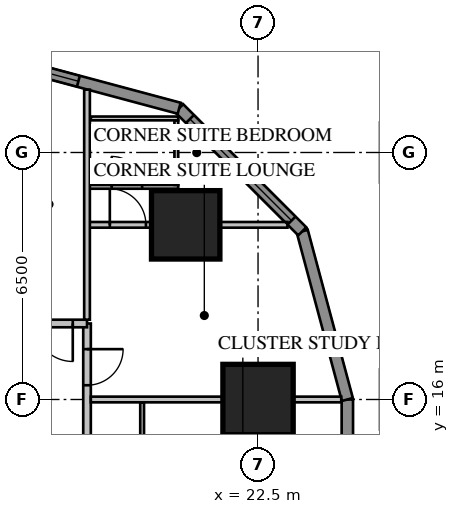
"""IFC4 building model, lengths in metres.
Left out: names, types, materials, properties, quantities, classifications, styles, units other than length and angle.
Written with IfcOpenShell. Run it as: python <this file> out.ifc"""

import sys

from ifc_helpers import new_model, si_unit, direction, frame, frame_2d, origin, origin_2d, place, context, subcontext, project, spatial, rectangle, extrude, element, fill, save


model = new_model("IFC4")
c1 = context("Model", 3, precision=1e-05, world=origin(), true_north=direction((0.0, 1.0)))
c2 = subcontext(c1, "Body", "Model", "MODEL_VIEW")
j1 = project(units=[si_unit("LENGTHUNIT", "METRE"), si_unit("PLANEANGLEUNIT", "RADIAN")], contexts=[c1])
p1 = place(None, origin())
s1 = spatial("IfcSite", under=j1, at=p1, CompositionType="ELEMENT")
p2 = place(p1, origin())
s2 = spatial("IfcBuilding", under=s1, at=p2, CompositionType="ELEMENT")
p3 = place(p2, frame((0.0, 0.0, 23.7)))
s3 = spatial("IfcBuildingStorey", under=s2, at=p3, CompositionType="ELEMENT", Elevation=23.7)
p4 = place(p3, frame((22.5, 16.0, 0.0), z_axis=(0.0, 0.0, 1.0), x_axis=(1.0, 0.0, 0.0)))
e1 = element("IfcColumn", 1, at=p4, inside=s3, PredefinedType="COLUMN", context=c2, shape_type="SweptSolid", body=[
    extrude(rectangle(XDim=1.85, YDim=1.85, at=origin_2d()), origin(), (0.0, 0.0, 1.0), 3.85),
])
p5 = place(p3, frame((20.596, 20.596, 0.0), z_axis=(0.0, 0.0, 1.0), x_axis=(1.0, 0.0, 0.0)))
e2 = element("IfcColumn", 2, at=p5, inside=s3, PredefinedType="COLUMN", context=c2, shape_type="SweptSolid", body=[
    extrude(rectangle(XDim=1.8, YDim=1.8, at=origin_2d()), origin(), (0.0, 0.0, 1.0), 3.85),
])
p6 = place(p3, frame((24.85, -16.0, 0.0), z_axis=(0.0, 0.0, 1.0), x_axis=(0.0, 1.0, 0.0)))
e3 = element("IfcWall", 3, at=p6, inside=s3, PredefinedType="SOLIDWALL", context=c2, shape_type="SweptSolid", body=[
    extrude(rectangle(XDim=32.0, YDim=0.3, at=frame_2d((16.0, 0.0))), origin(), (0.0, 0.0, 1.0), 3.65),
])
p7 = place(p6, frame((1.2, 0.0, 0.75)))
e4 = element("IfcOpeningElement", 4, at=p7, cuts=e3, PredefinedType="OPENING", context=c2, shape_type="SweptSolid", body=[
    extrude(rectangle(XDim=1.6, YDim=1.8, at=frame_2d((0.8, 0.9))), frame((0.0, 0.17, 0.0), z_axis=(0.0, -1.0, 0.0), x_axis=(1.0, 0.0, 0.0)), (0.0, 0.0, 1.0), 0.34),
])
p8 = place(p6, frame((5.2, 0.0, 0.75)))
e5 = element("IfcOpeningElement", 5, at=p8, cuts=e3, PredefinedType="OPENING", context=c2, shape_type="SweptSolid", body=[
    extrude(rectangle(XDim=1.6, YDim=1.8, at=frame_2d((0.8, 0.9))), frame((0.0, 0.17, 0.0), z_axis=(0.0, -1.0, 0.0), x_axis=(1.0, 0.0, 0.0)), (0.0, 0.0, 1.0), 0.34),
])
p9 = place(p6, frame((17.2, 0.0, 0.75)))
e6 = element("IfcOpeningElement", 6, at=p9, cuts=e3, PredefinedType="OPENING", context=c2, shape_type="SweptSolid", body=[
    extrude(rectangle(XDim=1.6, YDim=1.8, at=frame_2d((0.8, 0.9))), frame((0.0, 0.17, 0.0), z_axis=(0.0, -1.0, 0.0), x_axis=(1.0, 0.0, 0.0)), (0.0, 0.0, 1.0), 0.34),
])
p10 = place(p6, frame((21.2, 0.0, 0.75)))
e7 = element("IfcOpeningElement", 7, at=p10, cuts=e3, PredefinedType="OPENING", context=c2, shape_type="SweptSolid", body=[
    extrude(rectangle(XDim=1.6, YDim=1.8, at=frame_2d((0.8, 0.9))), frame((0.0, 0.17, 0.0), z_axis=(0.0, -1.0, 0.0), x_axis=(1.0, 0.0, 0.0)), (0.0, 0.0, 1.0), 0.34),
])
p11 = place(p6, frame((25.2, 0.0, 0.75)))
e8 = element("IfcOpeningElement", 8, at=p11, cuts=e3, PredefinedType="OPENING", context=c2, shape_type="SweptSolid", body=[
    extrude(rectangle(XDim=1.6, YDim=1.8, at=frame_2d((0.8, 0.9))), frame((0.0, 0.17, 0.0), z_axis=(0.0, -1.0, 0.0), x_axis=(1.0, 0.0, 0.0)), (0.0, 0.0, 1.0), 0.34),
])
p12 = place(p6, frame((29.2, 0.0, 0.75)))
e9 = element("IfcOpeningElement", 9, at=p12, cuts=e3, PredefinedType="OPENING", context=c2, shape_type="SweptSolid", body=[
    extrude(rectangle(XDim=1.6, YDim=1.8, at=frame_2d((0.8, 0.9))), frame((0.0, 0.17, 0.0), z_axis=(0.0, -1.0, 0.0), x_axis=(1.0, 0.0, 0.0)), (0.0, 0.0, 1.0), 0.34),
])
p13 = place(p6, frame((8.8, 0.0, 0.75)))
e10 = element("IfcOpeningElement", 10, at=p13, cuts=e3, PredefinedType="OPENING", context=c2, shape_type="SweptSolid", body=[
    extrude(rectangle(XDim=2.4, YDim=1.8, at=frame_2d((1.2, 0.9))), frame((0.0, 0.17, 0.0), z_axis=(0.0, -1.0, 0.0), x_axis=(1.0, 0.0, 0.0)), (0.0, 0.0, 1.0), 0.34),
])
p14 = place(p6, frame((13.812, 0.0, 0.0)))
e11 = element("IfcOpeningElement", 11, at=p14, cuts=e3, PredefinedType="OPENING", context=c2, shape_type="SweptSolid", body=[
    extrude(rectangle(XDim=1.0, YDim=2.4, at=frame_2d((0.5, 1.2))), frame((0.0, 0.17, 0.0), z_axis=(0.0, -1.0, 0.0), x_axis=(1.0, 0.0, 0.0)), (0.0, 0.0, 1.0), 0.34),
])
p15 = place(p3, frame((24.85, 16.0, 0.0), z_axis=(0.0, 0.0, 1.0), x_axis=(-0.258839972501, 0.965920218567, 0.0)))
e12 = element("IfcWall", 12, at=p15, inside=s3, PredefinedType="SOLIDWALL", context=c2, shape_type="SweptSolid", body=[
    extrude(rectangle(XDim=4.581, YDim=0.3, at=frame_2d((2.291, 0.0))), origin(), (0.0, 0.0, 1.0), 3.65),
])
p16 = place(p3, frame((23.664, 20.425, 0.0), z_axis=(0.0, 0.0, 1.0), x_axis=(-0.707106781187, 0.707106781187, 0.0)))
e13 = element("IfcWall", 13, at=p16, inside=s3, PredefinedType="SOLIDWALL", context=c2, shape_type="SweptSolid", body=[
    extrude(rectangle(XDim=4.581, YDim=0.3, at=frame_2d((2.291, 0.0))), origin(), (0.0, 0.0, 1.0), 3.65),
])
p17 = place(p16, frame((0.4, 0.0, 0.75)))
e14 = element("IfcOpeningElement", 14, at=p17, cuts=e13, PredefinedType="OPENING", context=c2, shape_type="SweptSolid", body=[
    extrude(rectangle(XDim=3.781, YDim=1.8, at=frame_2d((1.891, 0.9))), frame((0.0, 0.17, 0.0), z_axis=(0.0, -1.0, 0.0), x_axis=(1.0, 0.0, 0.0)), (0.0, 0.0, 1.0), 0.34),
])
p18 = place(p3, frame((20.425, 23.664, 0.0), z_axis=(0.0, 0.0, 1.0), x_axis=(-0.965920218567, 0.258839972501, 0.0)))
e15 = element("IfcWall", 15, at=p18, inside=s3, PredefinedType="SOLIDWALL", context=c2, shape_type="SweptSolid", body=[
    extrude(rectangle(XDim=4.581, YDim=0.3, at=frame_2d((2.291, 0.0))), origin(), (0.0, 0.0, 1.0), 3.65),
])
p19 = place(p18, frame((2.746, 0.0, 0.75)))
e16 = element("IfcOpeningElement", 16, at=p19, cuts=e15, PredefinedType="OPENING", context=c2, shape_type="SweptSolid", body=[
    extrude(rectangle(XDim=1.6, YDim=1.8, at=frame_2d((0.8, 0.9))), frame((0.0, 0.17, 0.0), z_axis=(0.0, -1.0, 0.0), x_axis=(1.0, 0.0, 0.0)), (0.0, 0.0, 1.0), 0.34),
])
p20 = place(p3, frame((18.0, -18.0, 0.0), z_axis=(0.0, 0.0, 1.0), x_axis=(0.0, 1.0, 0.0)))
e17 = element("IfcWall", 17, at=p20, inside=s3, PredefinedType="PARTITIONING", context=c2, shape_type="SweptSolid", body=[
    extrude(rectangle(XDim=36.0, YDim=0.2, at=frame_2d((18.0, 0.0))), origin(), (0.0, 0.0, 1.0), 3.65),
])
p21 = place(p20, frame((10.4, 0.0, 0.0)))
e18 = element("IfcOpeningElement", 18, at=p21, cuts=e17, PredefinedType="OPENING", context=c2, shape_type="SweptSolid", body=[
    extrude(rectangle(XDim=1.0, YDim=2.1, at=frame_2d((0.5, 1.05))), frame((0.0, 0.12, 0.0), z_axis=(0.0, -1.0, 0.0), x_axis=(1.0, 0.0, 0.0)), (0.0, 0.0, 1.0), 0.24),
])
p22 = place(p20, frame((0.375, 0.0, 0.0)))
e19 = element("IfcOpeningElement", 19, at=p22, cuts=e17, PredefinedType="OPENING", context=c2, shape_type="SweptSolid", body=[
    extrude(rectangle(XDim=1.0, YDim=2.1, at=frame_2d((0.5, 1.05))), frame((0.0, 0.12, 0.0), z_axis=(0.0, -1.0, 0.0), x_axis=(1.0, 0.0, 0.0)), (0.0, 0.0, 1.0), 0.24),
])
p23 = place(p20, frame((34.375, 0.0, 0.0)))
e20 = element("IfcOpeningElement", 20, at=p23, cuts=e17, PredefinedType="OPENING", context=c2, shape_type="SweptSolid", body=[
    extrude(rectangle(XDim=0.95, YDim=2.1, at=frame_2d((0.475, 1.05))), frame((0.0, 0.12, 0.0), z_axis=(0.0, -1.0, 0.0), x_axis=(1.0, 0.0, 0.0)), (0.0, 0.0, 1.0), 0.24),
])
p24 = place(p3, frame((19.45, -15.925, 0.0), z_axis=(0.0, 0.0, 1.0), x_axis=(0.0, 1.0, 0.0)))
e21 = element("IfcWall", 21, at=p24, inside=s3, PredefinedType="PARTITIONING", context=c2, shape_type="SweptSolid", body=[
    extrude(rectangle(XDim=31.85, YDim=0.1, at=frame_2d((15.925, 0.0))), origin(), (0.0, 0.0, 1.0), 3.65),
])
p25 = place(p24, frame((10.125, 0.0, 0.0)))
e22 = element("IfcOpeningElement", 22, at=p25, cuts=e21, PredefinedType="OPENING", context=c2, shape_type="SweptSolid", body=[
    extrude(rectangle(XDim=1.0, YDim=2.1, at=frame_2d((0.5, 1.05))), frame((0.0, 0.07, 0.0), z_axis=(0.0, -1.0, 0.0), x_axis=(1.0, 0.0, 0.0)), (0.0, 0.0, 1.0), 0.14),
])
p26 = place(p24, frame((8.3, 0.0, 0.0)))
e23 = element("IfcOpeningElement", 23, at=p26, cuts=e21, PredefinedType="OPENING", context=c2, shape_type="SweptSolid", body=[
    extrude(rectangle(XDim=0.8, YDim=2.1, at=frame_2d((0.4, 1.05))), frame((0.0, 0.07, 0.0), z_axis=(0.0, -1.0, 0.0), x_axis=(1.0, 0.0, 0.0)), (0.0, 0.0, 1.0), 0.14),
])
p27 = place(p24, frame((1.725, 0.0, 0.0)))
e24 = element("IfcOpeningElement", 24, at=p27, cuts=e21, PredefinedType="OPENING", context=c2, shape_type="SweptSolid", body=[
    extrude(rectangle(XDim=0.95, YDim=2.1, at=frame_2d((0.475, 1.05))), frame((0.0, 0.07, 0.0), z_axis=(0.0, -1.0, 0.0), x_axis=(1.0, 0.0, 0.0)), (0.0, 0.0, 1.0), 0.14),
])
p28 = place(p24, frame((5.725, 0.0, 0.0)))
e25 = element("IfcOpeningElement", 25, at=p28, cuts=e21, PredefinedType="OPENING", context=c2, shape_type="SweptSolid", body=[
    extrude(rectangle(XDim=0.95, YDim=2.1, at=frame_2d((0.475, 1.05))), frame((0.0, 0.07, 0.0), z_axis=(0.0, -1.0, 0.0), x_axis=(1.0, 0.0, 0.0)), (0.0, 0.0, 1.0), 0.14),
])
p29 = place(p24, frame((17.725, 0.0, 0.0)))
e26 = element("IfcOpeningElement", 26, at=p29, cuts=e21, PredefinedType="OPENING", context=c2, shape_type="SweptSolid", body=[
    extrude(rectangle(XDim=0.95, YDim=2.1, at=frame_2d((0.475, 1.05))), frame((0.0, 0.07, 0.0), z_axis=(0.0, -1.0, 0.0), x_axis=(1.0, 0.0, 0.0)), (0.0, 0.0, 1.0), 0.14),
])
p30 = place(p24, frame((21.725, 0.0, 0.0)))
e27 = element("IfcOpeningElement", 27, at=p30, cuts=e21, PredefinedType="OPENING", context=c2, shape_type="SweptSolid", body=[
    extrude(rectangle(XDim=0.95, YDim=2.1, at=frame_2d((0.475, 1.05))), frame((0.0, 0.07, 0.0), z_axis=(0.0, -1.0, 0.0), x_axis=(1.0, 0.0, 0.0)), (0.0, 0.0, 1.0), 0.14),
])
p31 = place(p24, frame((25.725, 0.0, 0.0)))
e28 = element("IfcOpeningElement", 28, at=p31, cuts=e21, PredefinedType="OPENING", context=c2, shape_type="SweptSolid", body=[
    extrude(rectangle(XDim=0.95, YDim=2.1, at=frame_2d((0.475, 1.05))), frame((0.0, 0.07, 0.0), z_axis=(0.0, -1.0, 0.0), x_axis=(1.0, 0.0, 0.0)), (0.0, 0.0, 1.0), 0.14),
])
p32 = place(p24, frame((29.725, 0.0, 0.0)))
e29 = element("IfcOpeningElement", 29, at=p32, cuts=e21, PredefinedType="OPENING", context=c2, shape_type="SweptSolid", body=[
    extrude(rectangle(XDim=0.95, YDim=2.1, at=frame_2d((0.475, 1.05))), frame((0.0, 0.07, 0.0), z_axis=(0.0, -1.0, 0.0), x_axis=(1.0, 0.0, 0.0)), (0.0, 0.0, 1.0), 0.14),
])
p33 = place(p3, frame((18.1, 16.0, 0.0), z_axis=(0.0, 0.0, 1.0), x_axis=(1.0, 0.0, 0.0)))
e30 = element("IfcWall", 30, at=p33, inside=s3, PredefinedType="PARTITIONING", context=c2, shape_type="SweptSolid", body=[
    extrude(rectangle(XDim=6.589, YDim=0.15, at=frame_2d((3.295, 0.0))), origin(), (0.0, 0.0, 1.0), 3.65),
])
p34 = place(p3, frame((18.065, 21.596, 0.0), z_axis=(0.0, 0.0, 1.0), x_axis=(1.0, 0.0, 0.0)))
e31 = element("IfcWall", 31, at=p34, inside=s3, PredefinedType="PARTITIONING", context=c2, shape_type="SweptSolid", body=[
    extrude(rectangle(XDim=2.335, YDim=0.1, at=frame_2d((1.167, 0.0))), origin(), (0.0, 0.0, 1.0), 3.65),
])
p35 = place(p34, frame((0.585, 0.0, 0.0)))
e32 = element("IfcOpeningElement", 32, at=p35, cuts=e31, PredefinedType="OPENING", context=c2, shape_type="SweptSolid", body=[
    extrude(rectangle(XDim=0.8, YDim=2.1, at=frame_2d((0.4, 1.05))), frame((0.0, 0.07, 0.0), z_axis=(0.0, -1.0, 0.0), x_axis=(1.0, 0.0, 0.0)), (0.0, 0.0, 1.0), 0.14),
])
p36 = place(p3, frame((20.35, 21.646, 0.0), z_axis=(0.0, 0.0, 1.0), x_axis=(0.0, 1.0, 0.0)))
e33 = element("IfcWall", 33, at=p36, inside=s3, PredefinedType="PARTITIONING", context=c2, shape_type="SweptSolid", body=[
    extrude(rectangle(XDim=1.7, YDim=0.1, at=frame_2d((0.85, 0.0))), origin(), (0.0, 0.0, 1.0), 3.65),
])
p37 = place(p3, frame((18.1, 23.396, 0.0), z_axis=(0.0, 0.0, 1.0), x_axis=(1.0, 0.0, 0.0)))
e34 = element("IfcWall", 34, at=p37, inside=s3, PredefinedType="PARTITIONING", context=c2, shape_type="SweptSolid", body=[
    extrude(rectangle(XDim=2.3, YDim=0.1, at=frame_2d((1.15, 0.0))), origin(), (0.0, 0.0, 1.0), 3.65),
])
p38 = place(p3, frame((18.065, 20.596, 0.0), z_axis=(0.0, 0.0, 1.0), x_axis=(1.0, 0.0, 0.0)))
e35 = element("IfcWall", 35, at=p38, inside=s3, PredefinedType="PARTITIONING", context=c2, shape_type="SweptSolid", body=[
    extrude(rectangle(XDim=5.209, YDim=0.15, at=frame_2d((2.604, 0.0))), origin(), (0.0, 0.0, 1.0), 3.65),
])
p39 = place(p38, frame((0.535, 0.0, 0.0)))
e36 = element("IfcOpeningElement", 36, at=p39, cuts=e35, PredefinedType="OPENING", context=c2, shape_type="SweptSolid", body=[
    extrude(rectangle(XDim=0.95, YDim=2.1, at=frame_2d((0.475, 1.05))), frame((0.0, 0.095, 0.0), z_axis=(0.0, -1.0, 0.0), x_axis=(1.0, 0.0, 0.0)), (0.0, 0.0, 1.0), 0.19),
])
p40 = place(p3, frame((18.0, 18.0, 0.0), z_axis=(0.0, 0.0, 1.0), x_axis=(-1.0, 0.0, 0.0)))
e37 = element("IfcWall", 37, at=p40, inside=s3, PredefinedType="PARTITIONING", context=c2, shape_type="SweptSolid", body=[
    extrude(rectangle(XDim=36.0, YDim=0.2, at=frame_2d((18.0, 0.0))), origin(), (0.0, 0.0, 1.0), 3.65),
])
p41 = place(p40, frame((0.375, 0.0, 0.0)))
e38 = element("IfcOpeningElement", 38, at=p41, cuts=e37, PredefinedType="OPENING", context=c2, shape_type="SweptSolid", body=[
    extrude(rectangle(XDim=1.0, YDim=2.1, at=frame_2d((0.5, 1.05))), frame((0.0, 0.12, 0.0), z_axis=(0.0, -1.0, 0.0), x_axis=(1.0, 0.0, 0.0)), (0.0, 0.0, 1.0), 0.24),
])
p42 = place(p40, frame((3.8, 0.0, 0.0)))
e39 = element("IfcOpeningElement", 39, at=p42, cuts=e37, PredefinedType="OPENING", context=c2, shape_type="SweptSolid", body=[
    extrude(rectangle(XDim=0.95, YDim=2.1, at=frame_2d((0.475, 1.05))), frame((0.0, 0.12, 0.0), z_axis=(0.0, -1.0, 0.0), x_axis=(1.0, 0.0, 0.0)), (0.0, 0.0, 1.0), 0.24),
])
p43 = place(p40, frame((7.8, 0.0, 0.0)))
e40 = element("IfcOpeningElement", 40, at=p43, cuts=e37, PredefinedType="OPENING", context=c2, shape_type="SweptSolid", body=[
    extrude(rectangle(XDim=0.95, YDim=2.1, at=frame_2d((0.475, 1.05))), frame((0.0, 0.12, 0.0), z_axis=(0.0, -1.0, 0.0), x_axis=(1.0, 0.0, 0.0)), (0.0, 0.0, 1.0), 0.24),
])
p44 = place(p40, frame((19.8, 0.0, 0.0)))
e41 = element("IfcOpeningElement", 41, at=p44, cuts=e37, PredefinedType="OPENING", context=c2, shape_type="SweptSolid", body=[
    extrude(rectangle(XDim=0.95, YDim=2.1, at=frame_2d((0.475, 1.05))), frame((0.0, 0.12, 0.0), z_axis=(0.0, -1.0, 0.0), x_axis=(1.0, 0.0, 0.0)), (0.0, 0.0, 1.0), 0.24),
])
p45 = place(p40, frame((23.8, 0.0, 0.0)))
e42 = element("IfcOpeningElement", 42, at=p45, cuts=e37, PredefinedType="OPENING", context=c2, shape_type="SweptSolid", body=[
    extrude(rectangle(XDim=0.95, YDim=2.1, at=frame_2d((0.475, 1.05))), frame((0.0, 0.12, 0.0), z_axis=(0.0, -1.0, 0.0), x_axis=(1.0, 0.0, 0.0)), (0.0, 0.0, 1.0), 0.24),
])
p46 = place(p40, frame((27.8, 0.0, 0.0)))
e43 = element("IfcOpeningElement", 43, at=p46, cuts=e37, PredefinedType="OPENING", context=c2, shape_type="SweptSolid", body=[
    extrude(rectangle(XDim=0.95, YDim=2.1, at=frame_2d((0.475, 1.05))), frame((0.0, 0.12, 0.0), z_axis=(0.0, -1.0, 0.0), x_axis=(1.0, 0.0, 0.0)), (0.0, 0.0, 1.0), 0.24),
])
p47 = place(p40, frame((31.8, 0.0, 0.0)))
e44 = element("IfcOpeningElement", 44, at=p47, cuts=e37, PredefinedType="OPENING", context=c2, shape_type="SweptSolid", body=[
    extrude(rectangle(XDim=0.95, YDim=2.1, at=frame_2d((0.475, 1.05))), frame((0.0, 0.12, 0.0), z_axis=(0.0, -1.0, 0.0), x_axis=(1.0, 0.0, 0.0)), (0.0, 0.0, 1.0), 0.24),
])
p48 = place(p40, frame((34.375, 0.0, 0.0)))
e45 = element("IfcOpeningElement", 45, at=p48, cuts=e37, PredefinedType="OPENING", context=c2, shape_type="SweptSolid", body=[
    extrude(rectangle(XDim=0.95, YDim=2.1, at=frame_2d((0.475, 1.05))), frame((0.0, 0.12, 0.0), z_axis=(0.0, -1.0, 0.0), x_axis=(1.0, 0.0, 0.0)), (0.0, 0.0, 1.0), 0.24),
])
p49 = place(p40, frame((11.2, 0.0, 0.0)))
e46 = element("IfcOpeningElement", 46, at=p49, cuts=e37, PredefinedType="OPENING", context=c2, shape_type="SweptSolid", body=[
    extrude(rectangle(XDim=1.0, YDim=2.1, at=frame_2d((0.5, 1.05))), frame((0.0, 0.12, 0.0), z_axis=(0.0, -1.0, 0.0), x_axis=(1.0, 0.0, 0.0)), (0.0, 0.0, 1.0), 0.24),
])
p50 = place(p3, frame((18.0, 18.1, 0.0), z_axis=(0.0, 0.0, 1.0), x_axis=(0.0, 1.0, 0.0)))
e47 = element("IfcWall", 47, at=p50, inside=s3, PredefinedType="PARTITIONING", context=c2, shape_type="SweptSolid", body=[
    extrude(rectangle(XDim=6.053, YDim=0.15, at=frame_2d((3.027, 0.0))), origin(), (0.0, 0.0, 1.0), 3.65),
])
p51 = place(p17, origin())
e48 = element("IfcWindow", 48, at=p51, inside=s3, PartitioningType="SINGLE_PANEL", PredefinedType="WINDOW", context=c2, shape_type="SweptSolid", body=[
    extrude(rectangle(XDim=3.781, YDim=1.8, at=frame_2d((1.891, 0.9))), frame((0.0, 0.03, 0.0), z_axis=(0.0, -1.0, 0.0), x_axis=(1.0, 0.0, 0.0)), (0.0, 0.0, 1.0), 0.06),
])
fill(e14, e48)
p52 = place(p19, origin())
e49 = element("IfcWindow", 49, at=p52, inside=s3, PartitioningType="SINGLE_PANEL", PredefinedType="WINDOW", context=c2, shape_type="SweptSolid", body=[
    extrude(rectangle(XDim=1.6, YDim=1.8, at=frame_2d((0.8, 0.9))), frame((0.0, 0.03, 0.0), z_axis=(0.0, -1.0, 0.0), x_axis=(1.0, 0.0, 0.0)), (0.0, 0.0, 1.0), 0.06),
])
fill(e16, e49)
p53 = place(p23, origin())
e50 = element("IfcDoor", 50, at=p53, inside=s3, OperationType="SINGLE_SWING_RIGHT", PredefinedType="DOOR", context=c2, shape_type="SweptSolid", body=[
    extrude(rectangle(XDim=0.95, YDim=2.1, at=frame_2d((0.475, 1.05))), frame((0.0, 0.025, 0.0), z_axis=(0.0, -1.0, 0.0), x_axis=(1.0, 0.0, 0.0)), (0.0, 0.0, 1.0), 0.05),
])
fill(e20, e50)
p54 = place(p35, origin())
e51 = element("IfcDoor", 51, at=p54, inside=s3, OperationType="SINGLE_SWING_LEFT", PredefinedType="DOOR", context=c2, shape_type="SweptSolid", body=[
    extrude(rectangle(XDim=0.8, YDim=2.1, at=frame_2d((0.4, 1.05))), frame((0.0, 0.025, 0.0), z_axis=(0.0, -1.0, 0.0), x_axis=(1.0, 0.0, 0.0)), (0.0, 0.0, 1.0), 0.05),
])
fill(e32, e51)
p55 = place(p39, origin())
e52 = element("IfcDoor", 52, at=p55, inside=s3, OperationType="SINGLE_SWING_LEFT", PredefinedType="DOOR", context=c2, shape_type="SweptSolid", body=[
    extrude(rectangle(XDim=0.95, YDim=2.1, at=frame_2d((0.475, 1.05))), frame((0.0, 0.025, 0.0), z_axis=(0.0, -1.0, 0.0), x_axis=(1.0, 0.0, 0.0)), (0.0, 0.0, 1.0), 0.05),
])
fill(e36, e52)
p56 = place(p41, origin())
e53 = element("IfcDoor", 53, at=p56, inside=s3, OperationType="SINGLE_SWING_LEFT", PredefinedType="DOOR", context=c2, shape_type="SweptSolid", body=[
    extrude(rectangle(XDim=1.0, YDim=2.1, at=frame_2d((0.5, 1.05))), frame((0.0, 0.025, 0.0), z_axis=(0.0, -1.0, 0.0), x_axis=(1.0, 0.0, 0.0)), (0.0, 0.0, 1.0), 0.05),
])
fill(e38, e53)
save(model, sys.argv[1])
